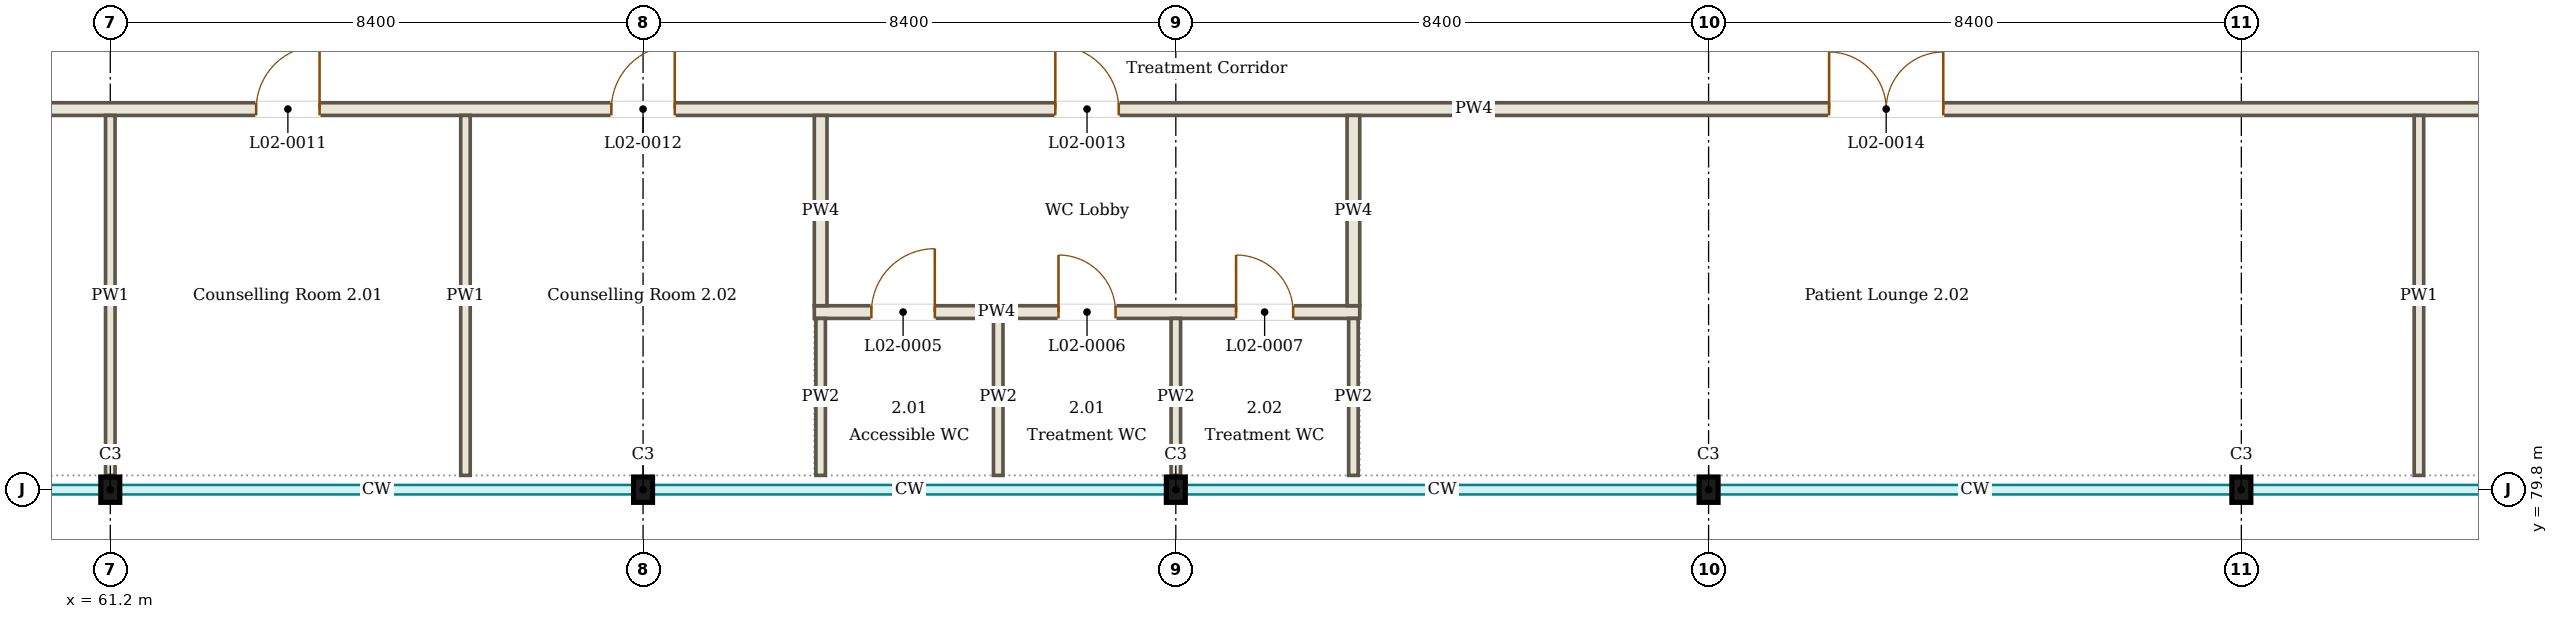
"""IFC4 building model, lengths in metres.
Left out: names, types, materials, properties, quantities, classifications, styles, units other than length and angle.
Written with IfcOpenShell. Run it as: python <this file> out.ifc"""

import sys

from ifc_helpers import new_model, si_unit, direction, frame, frame_2d, origin, origin_2d, place, context, subcontext, project, spatial, rectangle, i_section, extrude, element, fill, save


model = new_model("IFC4")
c1 = context("Model", 3, precision=1e-05, world=origin(), true_north=direction((0.0, 1.0)))
c2 = subcontext(c1, "Body", "Model", "MODEL_VIEW")
j1 = project(units=[si_unit("LENGTHUNIT", "METRE"), si_unit("PLANEANGLEUNIT", "RADIAN")], contexts=[c1])
p1 = place(None, origin())
s1 = spatial("IfcSite", under=j1, at=p1, CompositionType="ELEMENT")
p2 = place(p1, origin())
s2 = spatial("IfcBuilding", under=s1, at=p2, CompositionType="ELEMENT")
p3 = place(p2, frame((0.0, 0.0, 9.0)))
s3 = spatial("IfcBuildingStorey", under=s2, at=p3, CompositionType="ELEMENT", Elevation=9.0)
for number, where, z_axis, x_axis in (
    (1, (61.2, 79.8, 0.0), (0.0, 0.0, 1.0), (1.0, 0.0, 0.0)),
    (2, (69.6, 79.8, 0.0), (0.0, 0.0, 1.0), (1.0, 0.0, 0.0)),
    (3, (78.0, 79.8, 0.0), (0.0, 0.0, 1.0), (1.0, 0.0, 0.0)),
    (4, (86.4, 79.8, 0.0), (0.0, 0.0, 1.0), (1.0, 0.0, 0.0)),
    (5, (94.8, 79.8, 0.0), (0.0, 0.0, 1.0), (1.0, 0.0, 0.0)),
):
    element("IfcColumn", number, at=place(p3, frame(where, z_axis=z_axis, x_axis=x_axis)), inside=s3, PredefinedType="COLUMN", context=c2, shape_type="SweptSolid", body=[
        extrude(i_section(OverallWidth=0.3, OverallDepth=0.4, WebThickness=0.013, FlangeThickness=0.024, FilletRadius=0.027, at=origin_2d()), origin(), (0.0, 0.0, 1.0), 4.5),
    ])
p4 = place(p3, frame((72.3, 82.6, 0.0), z_axis=(0.0, 0.0, 1.0), x_axis=(1.0, 0.0, 0.0)))
e6 = element("IfcWall", 6, at=p4, inside=s3, PredefinedType="PARTITIONING", context=c2, shape_type="SweptSolid", body=[
    extrude(rectangle(XDim=8.6, YDim=0.2, at=frame_2d((4.3, 0.0))), origin(), (0.0, 0.0, 1.0), 3.9),
])
p5 = place(p4, frame((0.9, 0.0, 0.0)))
e7 = element("IfcOpeningElement", 7, at=p5, cuts=e6, PredefinedType="OPENING", context=c2, shape_type="SweptSolid", body=[
    extrude(rectangle(XDim=1.0, YDim=2.1, at=frame_2d((0.5, 1.05))), frame((0.0, 0.11, 0.0), z_axis=(0.0, -1.0, 0.0), x_axis=(1.0, 0.0, 0.0)), (0.0, 0.0, 1.0), 0.22),
])
p6 = place(p4, frame((3.85, 0.0, 0.0)))
e8 = element("IfcOpeningElement", 8, at=p6, cuts=e6, PredefinedType="OPENING", context=c2, shape_type="SweptSolid", body=[
    extrude(rectangle(XDim=0.9, YDim=2.1, at=frame_2d((0.45, 1.05))), frame((0.0, 0.11, 0.0), z_axis=(0.0, -1.0, 0.0), x_axis=(1.0, 0.0, 0.0)), (0.0, 0.0, 1.0), 0.22),
])
p7 = place(p4, frame((6.65, 0.0, 0.0)))
e9 = element("IfcOpeningElement", 9, at=p7, cuts=e6, PredefinedType="OPENING", context=c2, shape_type="SweptSolid", body=[
    extrude(rectangle(XDim=0.9, YDim=2.1, at=frame_2d((0.45, 1.05))), frame((0.0, 0.11, 0.0), z_axis=(0.0, -1.0, 0.0), x_axis=(1.0, 0.0, 0.0)), (0.0, 0.0, 1.0), 0.22),
])
p8 = place(p3, frame((44.25, 85.8, 0.0), z_axis=(0.0, 0.0, 1.0), x_axis=(1.0, 0.0, 0.0)))
e10 = element("IfcWall", 10, at=p8, inside=s3, PredefinedType="PARTITIONING", context=c2, shape_type="SweptSolid", body=[
    extrude(rectangle(XDim=67.5, YDim=0.2, at=frame_2d((33.75, 0.0))), origin(), (0.0, 0.0, 1.0), 3.9),
])
p9 = place(p8, frame((7.65, 0.0, 0.0)))
e11 = element("IfcOpeningElement", 11, at=p9, cuts=e10, PredefinedType="OPENING", context=c2, shape_type="SweptSolid", body=[
    extrude(rectangle(XDim=1.8, YDim=2.1, at=frame_2d((0.9, 1.05))), frame((0.0, 0.11, 0.0), z_axis=(0.0, -1.0, 0.0), x_axis=(1.0, 0.0, 0.0)), (0.0, 0.0, 1.0), 0.22),
])
p10 = place(p8, frame((19.25, 0.0, 0.0)))
e12 = element("IfcOpeningElement", 12, at=p10, cuts=e10, PredefinedType="OPENING", context=c2, shape_type="SweptSolid", body=[
    extrude(rectangle(XDim=1.0, YDim=2.1, at=frame_2d((0.5, 1.05))), frame((0.0, 0.11, 0.0), z_axis=(0.0, -1.0, 0.0), x_axis=(1.0, 0.0, 0.0)), (0.0, 0.0, 1.0), 0.22),
])
p11 = place(p8, frame((24.85, 0.0, 0.0)))
e13 = element("IfcOpeningElement", 13, at=p11, cuts=e10, PredefinedType="OPENING", context=c2, shape_type="SweptSolid", body=[
    extrude(rectangle(XDim=1.0, YDim=2.1, at=frame_2d((0.5, 1.05))), frame((0.0, 0.11, 0.0), z_axis=(0.0, -1.0, 0.0), x_axis=(1.0, 0.0, 0.0)), (0.0, 0.0, 1.0), 0.22),
])
p12 = place(p8, frame((31.85, 0.0, 0.0)))
e14 = element("IfcOpeningElement", 14, at=p12, cuts=e10, PredefinedType="OPENING", context=c2, shape_type="SweptSolid", body=[
    extrude(rectangle(XDim=1.0, YDim=2.1, at=frame_2d((0.5, 1.05))), frame((0.0, 0.11, 0.0), z_axis=(0.0, -1.0, 0.0), x_axis=(1.0, 0.0, 0.0)), (0.0, 0.0, 1.0), 0.22),
])
p13 = place(p8, frame((44.05, 0.0, 0.0)))
e15 = element("IfcOpeningElement", 15, at=p13, cuts=e10, PredefinedType="OPENING", context=c2, shape_type="SweptSolid", body=[
    extrude(rectangle(XDim=1.8, YDim=2.1, at=frame_2d((0.9, 1.05))), frame((0.0, 0.11, 0.0), z_axis=(0.0, -1.0, 0.0), x_axis=(1.0, 0.0, 0.0)), (0.0, 0.0, 1.0), 0.22),
])
p14 = place(p8, frame((55.65, 0.0, 0.0)))
e16 = element("IfcOpeningElement", 16, at=p14, cuts=e10, PredefinedType="OPENING", context=c2, shape_type="SweptSolid", body=[
    extrude(rectangle(XDim=1.0, YDim=2.1, at=frame_2d((0.5, 1.05))), frame((0.0, 0.11, 0.0), z_axis=(0.0, -1.0, 0.0), x_axis=(1.0, 0.0, 0.0)), (0.0, 0.0, 1.0), 0.22),
])
p15 = place(p8, frame((62.65, 0.0, 0.0)))
e17 = element("IfcOpeningElement", 17, at=p15, cuts=e10, PredefinedType="OPENING", context=c2, shape_type="SweptSolid", body=[
    extrude(rectangle(XDim=1.0, YDim=2.1, at=frame_2d((0.5, 1.05))), frame((0.0, 0.11, 0.0), z_axis=(0.0, -1.0, 0.0), x_axis=(1.0, 0.0, 0.0)), (0.0, 0.0, 1.0), 0.22),
])
p16 = place(p3, frame((61.2, 80.025, 0.0), z_axis=(0.0, 0.0, 1.0), x_axis=(0.0, 1.0, 0.0)))
e18 = element("IfcWall", 18, at=p16, inside=s3, PredefinedType="PARTITIONING", context=c2, shape_type="SweptSolid", body=[
    extrude(rectangle(XDim=5.675, YDim=0.15, at=frame_2d((2.837, 0.0))), origin(), (0.0, 0.0, 1.0), 3.9),
])
p17 = place(p3, frame((66.8, 80.025, 0.0), z_axis=(0.0, 0.0, 1.0), x_axis=(0.0, 1.0, 0.0)))
e19 = element("IfcWall", 19, at=p17, inside=s3, PredefinedType="PARTITIONING", context=c2, shape_type="SweptSolid", body=[
    extrude(rectangle(XDim=5.675, YDim=0.15, at=frame_2d((2.837, 0.0))), origin(), (0.0, 0.0, 1.0), 3.996),
])
p18 = place(p3, frame((72.4, 80.025, 0.0), z_axis=(0.0, 0.0, 1.0), x_axis=(0.0, 1.0, 0.0)))
e20 = element("IfcWall", 20, at=p18, inside=s3, PredefinedType="PARTITIONING", context=c2, shape_type="SweptSolid", body=[
    extrude(rectangle(XDim=2.475, YDim=0.15, at=frame_2d((1.238, 0.0))), origin(), (0.0, 0.0, 1.0), 3.996),
])
p19 = place(p3, frame((72.4, 82.7, 0.0), z_axis=(0.0, 0.0, 1.0), x_axis=(0.0, 1.0, 0.0)))
e21 = element("IfcWall", 21, at=p19, inside=s3, PredefinedType="PARTITIONING", context=c2, shape_type="SweptSolid", body=[
    extrude(rectangle(XDim=3.0, YDim=0.2, at=frame_2d((1.5, 0.0))), origin(), (0.0, 0.0, 1.0), 3.996),
])
p20 = place(p3, frame((75.2, 80.025, 0.0), z_axis=(0.0, 0.0, 1.0), x_axis=(0.0, 1.0, 0.0)))
e22 = element("IfcWall", 22, at=p20, inside=s3, PredefinedType="PARTITIONING", context=c2, shape_type="SweptSolid", body=[
    extrude(rectangle(XDim=2.475, YDim=0.15, at=frame_2d((1.238, 0.0))), origin(), (0.0, 0.0, 1.0), 3.996),
])
p21 = place(p3, frame((78.0, 80.025, 0.0), z_axis=(0.0, 0.0, 1.0), x_axis=(0.0, 1.0, 0.0)))
e23 = element("IfcWall", 23, at=p21, inside=s3, PredefinedType="PARTITIONING", context=c2, shape_type="SweptSolid", body=[
    extrude(rectangle(XDim=2.475, YDim=0.15, at=frame_2d((1.238, 0.0))), origin(), (0.0, 0.0, 1.0), 3.9),
])
p22 = place(p3, frame((80.8, 80.025, 0.0), z_axis=(0.0, 0.0, 1.0), x_axis=(0.0, 1.0, 0.0)))
e24 = element("IfcWall", 24, at=p22, inside=s3, PredefinedType="PARTITIONING", context=c2, shape_type="SweptSolid", body=[
    extrude(rectangle(XDim=2.475, YDim=0.15, at=frame_2d((1.238, 0.0))), origin(), (0.0, 0.0, 1.0), 3.996),
])
p23 = place(p3, frame((80.8, 82.7, 0.0), z_axis=(0.0, 0.0, 1.0), x_axis=(0.0, 1.0, 0.0)))
e25 = element("IfcWall", 25, at=p23, inside=s3, PredefinedType="PARTITIONING", context=c2, shape_type="SweptSolid", body=[
    extrude(rectangle(XDim=3.0, YDim=0.2, at=frame_2d((1.5, 0.0))), origin(), (0.0, 0.0, 1.0), 3.996),
])
p24 = place(p3, frame((97.6, 80.025, 0.0), z_axis=(0.0, 0.0, 1.0), x_axis=(0.0, 1.0, 0.0)))
e26 = element("IfcWall", 26, at=p24, inside=s3, PredefinedType="PARTITIONING", context=c2, shape_type="SweptSolid", body=[
    extrude(rectangle(XDim=5.675, YDim=0.15, at=frame_2d((2.837, 0.0))), origin(), (0.0, 0.0, 1.0), 3.996),
])
p25 = place(p5, origin())
e27 = element("IfcDoor", 27, at=p25, inside=s3, OperationType="SINGLE_SWING_RIGHT", PredefinedType="DOOR", context=c2, shape_type="SweptSolid", body=[
    extrude(rectangle(XDim=1.0, YDim=2.1, at=frame_2d((0.5, 1.05))), frame((0.0, 0.025, 0.0), z_axis=(0.0, -1.0, 0.0), x_axis=(1.0, 0.0, 0.0)), (0.0, 0.0, 1.0), 0.05),
])
fill(e7, e27)
p26 = place(p6, origin())
e28 = element("IfcDoor", 28, at=p26, inside=s3, OperationType="SINGLE_SWING_LEFT", PredefinedType="DOOR", context=c2, shape_type="SweptSolid", body=[
    extrude(rectangle(XDim=0.9, YDim=2.1, at=frame_2d((0.45, 1.05))), frame((0.0, 0.025, 0.0), z_axis=(0.0, -1.0, 0.0), x_axis=(1.0, 0.0, 0.0)), (0.0, 0.0, 1.0), 0.05),
])
fill(e8, e28)
p27 = place(p7, origin())
e29 = element("IfcDoor", 29, at=p27, inside=s3, OperationType="SINGLE_SWING_LEFT", PredefinedType="DOOR", context=c2, shape_type="SweptSolid", body=[
    extrude(rectangle(XDim=0.9, YDim=2.1, at=frame_2d((0.45, 1.05))), frame((0.0, 0.025, 0.0), z_axis=(0.0, -1.0, 0.0), x_axis=(1.0, 0.0, 0.0)), (0.0, 0.0, 1.0), 0.05),
])
fill(e9, e29)
p28 = place(p10, origin())
e30 = element("IfcDoor", 30, at=p28, inside=s3, OperationType="SINGLE_SWING_RIGHT", PredefinedType="DOOR", context=c2, shape_type="SweptSolid", body=[
    extrude(rectangle(XDim=1.0, YDim=2.1, at=frame_2d((0.5, 1.05))), frame((0.0, 0.025, 0.0), z_axis=(0.0, -1.0, 0.0), x_axis=(1.0, 0.0, 0.0)), (0.0, 0.0, 1.0), 0.05),
])
fill(e12, e30)
p29 = place(p11, origin())
e31 = element("IfcDoor", 31, at=p29, inside=s3, OperationType="SINGLE_SWING_RIGHT", PredefinedType="DOOR", context=c2, shape_type="SweptSolid", body=[
    extrude(rectangle(XDim=1.0, YDim=2.1, at=frame_2d((0.5, 1.05))), frame((0.0, 0.025, 0.0), z_axis=(0.0, -1.0, 0.0), x_axis=(1.0, 0.0, 0.0)), (0.0, 0.0, 1.0), 0.05),
])
fill(e13, e31)
p30 = place(p12, origin())
e32 = element("IfcDoor", 32, at=p30, inside=s3, OperationType="SINGLE_SWING_LEFT", PredefinedType="DOOR", context=c2, shape_type="SweptSolid", body=[
    extrude(rectangle(XDim=1.0, YDim=2.1, at=frame_2d((0.5, 1.05))), frame((0.0, 0.025, 0.0), z_axis=(0.0, -1.0, 0.0), x_axis=(1.0, 0.0, 0.0)), (0.0, 0.0, 1.0), 0.05),
])
fill(e14, e32)
p31 = place(p13, origin())
e33 = element("IfcDoor", 33, at=p31, inside=s3, OperationType="DOUBLE_DOOR_SINGLE_SWING", PredefinedType="DOOR", context=c2, shape_type="SweptSolid", body=[
    extrude(rectangle(XDim=1.8, YDim=2.1, at=frame_2d((0.9, 1.05))), frame((0.0, 0.025, 0.0), z_axis=(0.0, -1.0, 0.0), x_axis=(1.0, 0.0, 0.0)), (0.0, 0.0, 1.0), 0.05),
])
fill(e15, e33)
save(model, sys.argv[1])
